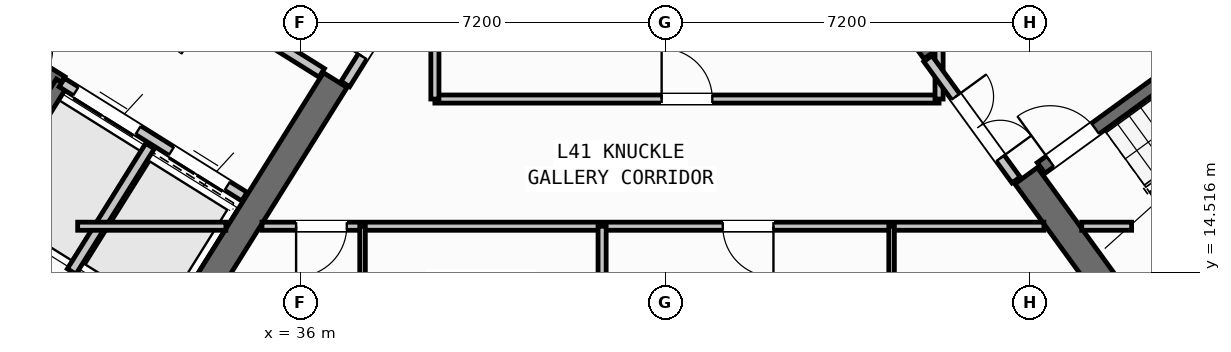
"""IFC4 building model, lengths in metres.
Left out: names, types, materials, properties, quantities, classifications, styles, units other than length and angle.
Written with IfcOpenShell. Run it as: python <this file> out.ifc"""

import sys

from ifc_helpers import new_model, si_unit, direction, frame, frame_2d, origin, place, context, subcontext, project, spatial, rectangle, extrude, source, transform, mapped, element, fill, save


model = new_model("IFC4")
c1 = context("Model", 3, precision=1e-05, world=origin(), true_north=direction((0.0, 1.0)))
c2 = subcontext(c1, "Body", "Model", "MODEL_VIEW")
j1 = project(units=[si_unit("LENGTHUNIT", "METRE"), si_unit("PLANEANGLEUNIT", "RADIAN")], contexts=[c1])
p1 = place(None, origin())
s1 = spatial("IfcSite", under=j1, at=p1, CompositionType="ELEMENT")
p2 = place(p1, origin())
s2 = spatial("IfcBuilding", under=s1, at=p2, CompositionType="ELEMENT")
p3 = place(p2, frame((0.0, 0.0, 162.3)))
s3 = spatial("IfcBuildingStorey", under=s2, at=p3, CompositionType="ELEMENT", Elevation=162.3)
p4 = place(p3, frame((33.366, 12.477, 0.0), z_axis=(0.0, 0.0, 1.0), x_axis=(-0.848047359947, 0.529920442413, 0.0)))
e1 = element("IfcWall", 1, at=p4, inside=s3, PredefinedType="SHEAR", context=c2, shape_type="SweptSolid", body=[
    extrude(rectangle(XDim=13.14, YDim=0.55, at=frame_2d((6.57, 0.0))), origin(), (0.0, 0.0, 1.0), 3.35),
])
p5 = place(p3, frame((36.683, 18.304, 0.0), z_axis=(0.0, 0.0, 1.0), x_axis=(-0.529896466841, -0.848062341122, 0.0)))
e2 = element("IfcWall", 2, at=p5, inside=s3, PredefinedType="SHEAR", context=c2, shape_type="SweptSolid", body=[
    extrude(rectangle(XDim=6.425, YDim=0.55, at=frame_2d((3.212, 0.0))), origin(), (0.0, 0.0, 1.0), 3.35),
])
p6 = place(p3, frame((52.359, 13.14, 0.0), z_axis=(0.0, 0.0, 1.0), x_axis=(0.809014896919, 0.587788139183, 0.0)))
e3 = element("IfcWall", 3, at=p6, inside=s3, PredefinedType="SHEAR", context=c2, shape_type="SweptSolid", body=[
    extrude(rectangle(XDim=12.34, YDim=0.55, at=frame_2d((6.17, 0.0))), origin(), (0.0, 0.0, 1.0), 3.35),
])
p7 = place(p3, frame((52.42, 13.524, 0.0), z_axis=(0.0, 0.0, 1.0), x_axis=(-0.587802113096, 0.809004744015, 0.0)))
e4 = element("IfcWall", 4, at=p7, inside=s3, PredefinedType="SHEAR", context=c2, shape_type="SweptSolid", body=[
    extrude(rectangle(XDim=3.575, YDim=0.55, at=frame_2d((1.788, 0.0))), origin(), (0.0, 0.0, 1.0), 3.35),
])
p8 = place(p3, frame((48.526, 18.884, 0.0), z_axis=(0.0, 0.0, 1.0), x_axis=(-0.587764933797, 0.809031756236, 0.0)))
e5 = element("IfcWall", 5, at=p8, inside=s3, PredefinedType="SHEAR", context=c2, shape_type="SweptSolid", body=[
    extrude(rectangle(XDim=6.425, YDim=0.55, at=frame_2d((3.212, 0.0))), origin(), (0.0, 0.0, 1.0), 3.35),
])
p9 = place(p3, frame((31.28, 18.261, 0.0), z_axis=(0.0, 0.0, 1.0), x_axis=(-0.848051618787, 0.529913626805, 0.0)))
e6 = element("IfcWall", 6, at=p9, inside=s3, PredefinedType="SHEAR", context=c2, shape_type="SweptSolid", body=[
    extrude(rectangle(XDim=7.46, YDim=0.26, at=frame_2d((3.73, 0.0))), origin(), (0.0, 0.0, 1.0), 3.35),
])
p10 = place(p9, frame((0.36, 0.0, 0.0)))
e7 = element("IfcOpeningElement", 7, at=p10, cuts=e6, PredefinedType="OPENING", context=c2, shape_type="SweptSolid", body=[
    extrude(rectangle(XDim=0.86, YDim=2.05, at=frame_2d((0.43, 1.025))), frame((0.0, 0.14, 0.0), z_axis=(0.0, -1.0, 0.0), x_axis=(1.0, 0.0, 0.0)), (0.0, 0.0, 1.0), 0.28),
])
p11 = place(p3, frame((31.288, 18.256, 0.0), z_axis=(0.0, 0.0, 1.0), x_axis=(-0.529943379326, -0.848033026897, 0.0)))
e8 = element("IfcWall", 8, at=p11, inside=s3, PredefinedType="SHEAR", context=c2, shape_type="SweptSolid", body=[
    extrude(rectangle(XDim=3.16, YDim=0.26, at=frame_2d((1.58, 0.0))), origin(), (0.0, 0.0, 1.0), 3.35),
])
p12 = place(p3, frame((34.891, 16.005, 0.0), z_axis=(0.0, 0.0, 1.0), x_axis=(-0.848062873452, 0.529895614884, 0.0)))
e9 = element("IfcWall", 9, at=p12, inside=s3, PredefinedType="STANDARD", context=c2, shape_type="SweptSolid", body=[
    extrude(rectangle(XDim=4.248, YDim=0.2, at=frame_2d((2.124, 0.0))), origin(), (0.0, 0.0, 1.0), 3.34),
])
p13 = place(p12, frame((0.398, 0.0, 0.0)))
e10 = element("IfcOpeningElement", 10, at=p13, cuts=e9, PredefinedType="OPENING", context=c2, shape_type="SweptSolid", body=[
    extrude(rectangle(XDim=1.3, YDim=2.2, at=frame_2d((0.65, 1.1))), frame((0.0, 0.11, 0.0), z_axis=(0.0, -1.0, 0.0), x_axis=(1.0, 0.0, 0.0)), (0.0, 0.0, 1.0), 0.22),
])
p14 = place(p12, frame((2.473, 0.0, 0.0)))
e11 = element("IfcOpeningElement", 11, at=p14, cuts=e9, PredefinedType="OPENING", context=c2, shape_type="SweptSolid", body=[
    extrude(rectangle(XDim=1.45, YDim=2.25, at=frame_2d((0.725, 1.125))), frame((0.0, 0.11, 0.0), z_axis=(0.0, -1.0, 0.0), x_axis=(1.0, 0.0, 0.0)), (0.0, 0.0, 1.0), 0.22),
])
p15 = place(p3, frame((36.417, 18.447, 0.0), z_axis=(0.0, 0.0, 1.0), x_axis=(-0.848064879198, 0.529892404805, 0.0)))
e12 = element("IfcWall", 12, at=p15, inside=s3, PredefinedType="STANDARD", context=c2, shape_type="SweptSolid", body=[
    extrude(rectangle(XDim=5.768, YDim=0.2, at=frame_2d((2.884, 0.0))), origin(), (0.0, 0.0, 1.0), 3.34),
])
p16 = place(p15, frame((2.548, 0.0, 0.0)))
e13 = element("IfcOpeningElement", 13, at=p16, cuts=e12, PredefinedType="OPENING", context=c2, shape_type="SweptSolid", body=[
    extrude(rectangle(XDim=1.15, YDim=2.1, at=frame_2d((0.575, 1.05))), frame((0.0, 0.11, 0.0), z_axis=(0.0, -1.0, 0.0), x_axis=(1.0, 0.0, 0.0)), (0.0, 0.0, 1.0), 0.22),
])
p17 = place(p3, frame((33.029, 17.003, 0.0), z_axis=(0.0, 0.0, 1.0), x_axis=(-0.529916267533, -0.848049968695, 0.0)))
e14 = element("IfcWall", 14, at=p17, inside=s3, PredefinedType="STANDARD", context=c2, shape_type="SweptSolid", body=[
    extrude(rectangle(XDim=2.92, YDim=0.2, at=frame_2d((1.46, 0.0))), origin(), (0.0, 0.0, 1.0), 3.34),
])
p18 = place(p3, frame((52.472, 14.013, 0.0), z_axis=(0.0, 0.0, 1.0), x_axis=(0.809028366311, 0.587769599847, 0.0)))
e15 = element("IfcWall", 15, at=p18, inside=s3, PredefinedType="SHEAR", context=c2, shape_type="SweptSolid", body=[
    extrude(rectangle(XDim=7.33, YDim=0.26, at=frame_2d((3.665, 0.0))), origin(), (0.0, 0.0, 1.0), 3.35),
])
p19 = place(p3, frame((50.615, 16.57, 0.0), z_axis=(0.0, 0.0, 1.0), x_axis=(0.809028366311, 0.587769599847, 0.0)))
e16 = element("IfcWall", 16, at=p19, inside=s3, PredefinedType="SHEAR", context=c2, shape_type="SweptSolid", body=[
    extrude(rectangle(XDim=7.33, YDim=0.26, at=frame_2d((3.665, 0.0))), origin(), (0.0, 0.0, 1.0), 3.35),
])
p20 = place(p19, frame((0.22, 0.0, 0.0)))
e17 = element("IfcOpeningElement", 17, at=p20, cuts=e16, PredefinedType="OPENING", context=c2, shape_type="SweptSolid", body=[
    extrude(rectangle(XDim=1.1, YDim=2.1, at=frame_2d((0.55, 1.05))), frame((0.0, 0.14, 0.0), z_axis=(0.0, -1.0, 0.0), x_axis=(1.0, 0.0, 0.0)), (0.0, 0.0, 1.0), 0.28),
])
p21 = place(p3, frame((32.164, 10.374, 0.0), z_axis=(0.0, 0.0, 1.0), x_axis=(-0.848044107957, 0.529925646633, 0.0)))
e18 = element("IfcWall", 18, at=p21, inside=s3, PredefinedType="PARTITIONING", context=c2, shape_type="SweptSolid", body=[
    extrude(rectangle(XDim=15.57, YDim=0.16, at=frame_2d((7.785, 0.0))), origin(), (0.0, 0.0, 1.0), 3.34),
])
p22 = place(p21, frame((10.83, 0.0, 0.0)))
e19 = element("IfcOpeningElement", 19, at=p22, cuts=e18, PredefinedType="OPENING", context=c2, shape_type="SweptSolid", body=[
    extrude(rectangle(XDim=1.0, YDim=2.1, at=frame_2d((0.5, 1.05))), frame((0.0, 0.09, 0.0), z_axis=(0.0, -1.0, 0.0), x_axis=(1.0, 0.0, 0.0)), (0.0, 0.0, 1.0), 0.18),
])
p23 = place(p3, frame((38.451, 20.737, 0.0), z_axis=(0.0, 0.0, 1.0), x_axis=(-0.529924799939, -0.848044637038, 0.0)))
e20 = element("IfcWall", 20, at=p23, inside=s3, PredefinedType="STANDARD", context=c2, shape_type="SweptSolid", body=[
    extrude(rectangle(XDim=2.96, YDim=0.2, at=frame_2d((1.48, 0.0))), origin(), (0.0, 0.0, 1.0), 3.34),
])
p24 = place(p23, frame((1.46, 0.0, 0.0)))
e21 = element("IfcOpeningElement", 21, at=p24, cuts=e20, PredefinedType="OPENING", context=c2, shape_type="SweptSolid", body=[
    extrude(rectangle(XDim=0.86, YDim=2.05, at=frame_2d((0.43, 1.025))), frame((0.0, 0.11, 0.0), z_axis=(0.0, -1.0, 0.0), x_axis=(1.0, 0.0, 0.0)), (0.0, 0.0, 1.0), 0.22),
])
p25 = place(p3, frame((31.6, 15.42, 0.0), z_axis=(0.0, 0.0, 1.0), x_axis=(1.0, 0.0, 0.0)))
e22 = element("IfcWall", 22, at=p25, inside=s3, PredefinedType="PARTITIONING", context=c2, shape_type="SweptSolid", body=[
    extrude(rectangle(XDim=2.925, YDim=0.16, at=frame_2d((1.462, 0.0))), origin(), (0.0, 0.0, 1.0), 3.34),
])
p26 = place(p3, frame((35.237, 15.42, 0.0), z_axis=(0.0, 0.0, 1.0), x_axis=(1.0, 0.0, 0.0)))
e23 = element("IfcWall", 23, at=p26, inside=s3, PredefinedType="PARTITIONING", context=c2, shape_type="SweptSolid", body=[
    extrude(rectangle(XDim=15.432, YDim=0.16, at=frame_2d((7.716, 0.0))), origin(), (0.0, 0.0, 1.0), 3.34),
])
p27 = place(p26, frame((0.674, 0.0, 0.0)))
e24 = element("IfcOpeningElement", 24, at=p27, cuts=e23, PredefinedType="OPENING", context=c2, shape_type="SweptSolid", body=[
    extrude(rectangle(XDim=1.0, YDim=2.1, at=frame_2d((0.5, 1.05))), frame((0.0, 0.09, 0.0), z_axis=(0.0, -1.0, 0.0), x_axis=(1.0, 0.0, 0.0)), (0.0, 0.0, 1.0), 0.18),
])
p28 = place(p26, frame((9.094, 0.0, 0.0)))
e25 = element("IfcOpeningElement", 25, at=p28, cuts=e23, PredefinedType="OPENING", context=c2, shape_type="SweptSolid", body=[
    extrude(rectangle(XDim=1.0, YDim=2.1, at=frame_2d((0.5, 1.05))), frame((0.0, 0.09, 0.0), z_axis=(0.0, -1.0, 0.0), x_axis=(1.0, 0.0, 0.0)), (0.0, 0.0, 1.0), 0.18),
])
p29 = place(p3, frame((51.416, 15.42, 0.0), z_axis=(0.0, 0.0, 1.0), x_axis=(1.0, 0.0, 0.0)))
e26 = element("IfcWall", 26, at=p29, inside=s3, PredefinedType="PARTITIONING", context=c2, shape_type="SweptSolid", body=[
    extrude(rectangle(XDim=0.984, YDim=0.16, at=frame_2d((0.492, 0.0))), origin(), (0.0, 0.0, 1.0), 3.34),
])
p30 = place(p3, frame((38.65, 17.93, 0.0), z_axis=(0.0, 0.0, 1.0), x_axis=(1.0, 0.0, 0.0)))
e27 = element("IfcWall", 27, at=p30, inside=s3, PredefinedType="PARTITIONING", context=c2, shape_type="SweptSolid", body=[
    extrude(rectangle(XDim=9.95, YDim=0.16, at=frame_2d((4.975, 0.0))), origin(), (0.0, 0.0, 1.0), 3.34),
])
p31 = place(p30, frame((4.475, 0.0, 0.0)))
e28 = element("IfcOpeningElement", 28, at=p31, cuts=e27, PredefinedType="OPENING", context=c2, shape_type="SweptSolid", body=[
    extrude(rectangle(XDim=1.0, YDim=2.1, at=frame_2d((0.5, 1.05))), frame((0.0, 0.09, 0.0), z_axis=(0.0, -1.0, 0.0), x_axis=(1.0, 0.0, 0.0)), (0.0, 0.0, 1.0), 0.18),
])
p32 = place(p3, frame((38.65, 17.93, 0.0), z_axis=(0.0, 0.0, 1.0), x_axis=(0.0, 1.0, 0.0)))
e29 = element("IfcWall", 29, at=p32, inside=s3, PredefinedType="PARTITIONING", context=c2, shape_type="SweptSolid", body=[
    extrude(rectangle(XDim=2.951, YDim=0.16, at=frame_2d((1.476, 0.0))), origin(), (0.0, 0.0, 1.0), 3.34),
])
p33 = place(p3, frame((48.6, 17.93, 0.0), z_axis=(0.0, 0.0, 1.0), x_axis=(0.0, 1.0, 0.0)))
e30 = element("IfcWall", 30, at=p33, inside=s3, PredefinedType="PARTITIONING", context=c2, shape_type="SweptSolid", body=[
    extrude(rectangle(XDim=0.993, YDim=0.16, at=frame_2d((0.496, 0.0))), origin(), (0.0, 0.0, 1.0), 3.34),
])
p34 = place(p3, frame((50.119, 16.333, 0.0), z_axis=(0.0, 0.0, 1.0), x_axis=(-0.587749856981, 0.809042709391, 0.0)))
e31 = element("IfcWall", 31, at=p34, inside=s3, PredefinedType="STANDARD", context=c2, shape_type="SweptSolid", body=[
    extrude(rectangle(XDim=2.96, YDim=0.2, at=frame_2d((1.48, 0.0))), origin(), (0.0, 0.0, 1.0), 3.34),
])
p35 = place(p34, frame((0.53, 0.0, 0.0)))
e32 = element("IfcOpeningElement", 32, at=p35, cuts=e31, PredefinedType="OPENING", context=c2, shape_type="SweptSolid", body=[
    extrude(rectangle(XDim=1.5, YDim=2.15, at=frame_2d((0.75, 1.075))), frame((0.0, 0.11, 0.0), z_axis=(0.0, -1.0, 0.0), x_axis=(1.0, 0.0, 0.0)), (0.0, 0.0, 1.0), 0.22),
])
p36 = place(p3, frame((41.95, 1.96, 0.0), z_axis=(0.0, 0.0, 1.0), x_axis=(0.0, 1.0, 0.0)))
e33 = element("IfcWall", 33, at=p36, inside=s3, PredefinedType="PARTITIONING", context=c2, shape_type="SweptSolid", body=[
    extrude(rectangle(XDim=13.46, YDim=0.16, at=frame_2d((6.73, 0.0))), origin(), (0.0, 0.0, 1.0), 3.34),
])
p37 = place(p3, frame((37.222, 1.96, 0.0), z_axis=(0.0, 0.0, 1.0), x_axis=(0.0, 1.0, 0.0)))
e34 = element("IfcWall", 34, at=p37, inside=s3, PredefinedType="PARTITIONING", context=c2, shape_type="SweptSolid", body=[
    extrude(rectangle(XDim=13.46, YDim=0.11, at=frame_2d((6.73, 0.0))), origin(), (0.0, 0.0, 1.0), 3.34),
])
p38 = place(p37, frame((5.2, 0.0, 0.0)))
e35 = element("IfcOpeningElement", 35, at=p38, cuts=e34, PredefinedType="OPENING", context=c2, shape_type="SweptSolid", body=[
    extrude(rectangle(XDim=0.92, YDim=2.08, at=frame_2d((0.46, 1.04))), frame((0.0, 0.065, 0.0), z_axis=(0.0, -1.0, 0.0), x_axis=(1.0, 0.0, 0.0)), (0.0, 0.0, 1.0), 0.13),
])
p39 = place(p37, frame((10.45, 0.0, 0.0)))
e36 = element("IfcOpeningElement", 36, at=p39, cuts=e34, PredefinedType="OPENING", context=c2, shape_type="SweptSolid", body=[
    extrude(rectangle(XDim=0.88, YDim=2.08, at=frame_2d((0.44, 1.04))), frame((0.0, 0.065, 0.0), z_axis=(0.0, -1.0, 0.0), x_axis=(1.0, 0.0, 0.0)), (0.0, 0.0, 1.0), 0.13),
])
p40 = place(p3, frame((47.663, 1.96, 0.0), z_axis=(0.0, 0.0, 1.0), x_axis=(0.0, 1.0, 0.0)))
e37 = element("IfcWall", 37, at=p40, inside=s3, PredefinedType="PARTITIONING", context=c2, shape_type="SweptSolid", body=[
    extrude(rectangle(XDim=13.46, YDim=0.11, at=frame_2d((6.73, 0.0))), origin(), (0.0, 0.0, 1.0), 3.34),
])
p41 = place(p40, frame((6.3, 0.0, 0.0)))
e38 = element("IfcOpeningElement", 38, at=p41, cuts=e37, PredefinedType="OPENING", context=c2, shape_type="SweptSolid", body=[
    extrude(rectangle(XDim=0.92, YDim=2.08, at=frame_2d((0.46, 1.04))), frame((0.0, 0.065, 0.0), z_axis=(0.0, -1.0, 0.0), x_axis=(1.0, 0.0, 0.0)), (0.0, 0.0, 1.0), 0.13),
])
p42 = place(p40, frame((11.1, 0.0, 0.0)))
e39 = element("IfcOpeningElement", 39, at=p42, cuts=e37, PredefinedType="OPENING", context=c2, shape_type="SweptSolid", body=[
    extrude(rectangle(XDim=0.88, YDim=2.08, at=frame_2d((0.44, 1.04))), frame((0.0, 0.065, 0.0), z_axis=(0.0, -1.0, 0.0), x_axis=(1.0, 0.0, 0.0)), (0.0, 0.0, 1.0), 0.13),
])
m1 = source(origin(), c2, "Body", "SweptSolid", [
    extrude(rectangle(XDim=1.3, YDim=2.2, at=frame_2d((0.65, 1.1))), frame((0.0, 0.025, 0.0), z_axis=(0.0, -1.0, 0.0), x_axis=(1.0, 0.0, 0.0)), (0.0, 0.0, 1.0), 0.05),
])
p43 = place(p13, origin())
e40 = element("IfcDoor", 40, at=p43, inside=s3, OperationType="DOUBLE_DOOR_SLIDING", PredefinedType="DOOR", context=c2, shape_type="MappedRepresentation", body=[
    mapped(m1, transform((0.0, 0.0, 0.0), scale=1.0)),
])
fill(e10, e40)
m2 = source(origin(), c2, "Body", "SweptSolid", [
    extrude(rectangle(XDim=1.45, YDim=2.25, at=frame_2d((0.725, 1.125))), frame((0.0, 0.025, 0.0), z_axis=(0.0, -1.0, 0.0), x_axis=(1.0, 0.0, 0.0)), (0.0, 0.0, 1.0), 0.05),
])
p44 = place(p14, origin())
e41 = element("IfcDoor", 41, at=p44, inside=s3, OperationType="DOUBLE_DOOR_SLIDING", PredefinedType="DOOR", context=c2, shape_type="MappedRepresentation", body=[
    mapped(m2, transform((0.0, 0.0, 0.0), scale=1.0)),
])
fill(e11, e41)
m3 = source(origin(), c2, "Body", "SweptSolid", [
    extrude(rectangle(XDim=1.1, YDim=2.1, at=frame_2d((0.55, 1.05))), frame((0.0, 0.025, 0.0), z_axis=(0.0, -1.0, 0.0), x_axis=(1.0, 0.0, 0.0)), (0.0, 0.0, 1.0), 0.05),
])
p45 = place(p20, origin())
e42 = element("IfcDoor", 42, at=p45, inside=s3, OperationType="SINGLE_SWING_LEFT", PredefinedType="DOOR", context=c2, shape_type="MappedRepresentation", body=[
    mapped(m3, transform((0.0, 0.0, 0.0), scale=1.0)),
])
fill(e17, e42)
m4 = source(origin(), c2, "Body", "SweptSolid", [
    extrude(rectangle(XDim=1.0, YDim=2.1, at=frame_2d((0.5, 1.05))), frame((0.0, 0.025, 0.0), z_axis=(0.0, -1.0, 0.0), x_axis=(1.0, 0.0, 0.0)), (0.0, 0.0, 1.0), 0.05),
])
p46 = place(p31, origin())
e43 = element("IfcDoor", 43, at=p46, inside=s3, OperationType="SINGLE_SWING_LEFT", PredefinedType="DOOR", context=c2, shape_type="MappedRepresentation", body=[
    mapped(m4, transform((0.0, 0.0, 0.0), scale=1.0)),
])
fill(e28, e43)
m5 = source(origin(), c2, "Body", "SweptSolid", [
    extrude(rectangle(XDim=0.86, YDim=2.05, at=frame_2d((0.43, 1.025))), frame((0.0, 0.025, 0.0), z_axis=(0.0, -1.0, 0.0), x_axis=(1.0, 0.0, 0.0)), (0.0, 0.0, 1.0), 0.05),
])
p47 = place(p24, frame((0.86, 0.0, 0.0), z_axis=(0.0, 0.0, 1.0), x_axis=(-1.0, 0.0, 0.0)))
e44 = element("IfcDoor", 44, at=p47, inside=s3, OperationType="SINGLE_SWING_LEFT", PredefinedType="DOOR", context=c2, shape_type="MappedRepresentation", body=[
    mapped(m5, transform((0.0, 0.0, 0.0), scale=1.0)),
])
fill(e21, e44)
m6 = source(origin(), c2, "Body", "SweptSolid", [
    extrude(rectangle(XDim=1.5, YDim=2.15, at=frame_2d((0.75, 1.075))), frame((0.0, 0.025, 0.0), z_axis=(0.0, -1.0, 0.0), x_axis=(1.0, 0.0, 0.0)), (0.0, 0.0, 1.0), 0.05),
])
p48 = place(p35, frame((1.5, 0.0, 0.0), z_axis=(0.0, 0.0, 1.0), x_axis=(-1.0, 0.0, 0.0)))
e45 = element("IfcDoor", 45, at=p48, inside=s3, OperationType="DOUBLE_DOOR_SINGLE_SWING", PredefinedType="DOOR", context=c2, shape_type="MappedRepresentation", body=[
    mapped(m6, transform((0.0, 0.0, 0.0), scale=1.0)),
])
fill(e32, e45)
p49 = place(p27, frame((1.0, 0.0, 0.0), z_axis=(0.0, 0.0, 1.0), x_axis=(-1.0, 0.0, 0.0)))
e46 = element("IfcDoor", 46, at=p49, inside=s3, OperationType="SINGLE_SWING_RIGHT", PredefinedType="DOOR", context=c2, shape_type="MappedRepresentation", body=[
    mapped(m4, transform((0.0, 0.0, 0.0), scale=1.0)),
])
fill(e24, e46)
p50 = place(p28, frame((1.0, 0.0, 0.0), z_axis=(0.0, 0.0, 1.0), x_axis=(-1.0, 0.0, 0.0)))
e47 = element("IfcDoor", 47, at=p50, inside=s3, OperationType="SINGLE_SWING_LEFT", PredefinedType="DOOR", context=c2, shape_type="MappedRepresentation", body=[
    mapped(m4, transform((0.0, 0.0, 0.0), scale=1.0)),
])
fill(e25, e47)
save(model, sys.argv[1])
